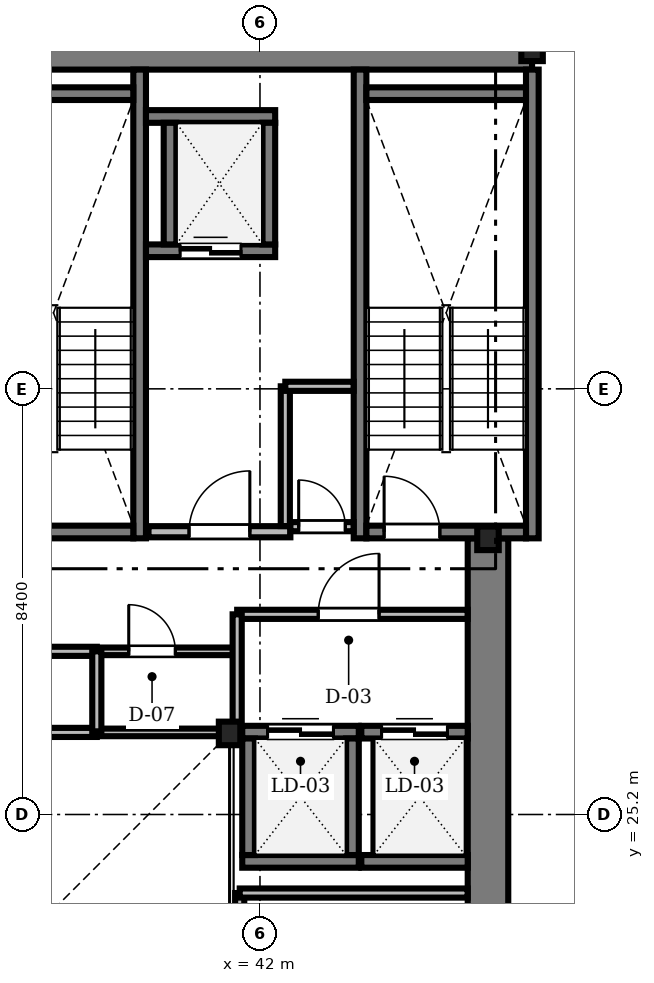
"""IFC4 building model, lengths in metres.
Left out: names, types, materials, properties, quantities, classifications, styles, units other than length and angle.
Written with IfcOpenShell. Run it as: python <this file> out.ifc"""

import sys

from ifc_helpers import new_model, si_unit, direction, frame, frame_2d, origin, origin_2d, place, context, subcontext, project, spatial, rectangle, i_section, extrude, source, transform, mapped, element, fill, save


model = new_model("IFC4")
c1 = context("Model", 3, precision=1e-05, world=origin(), true_north=direction((0.0, 1.0)))
c2 = subcontext(c1, "Body", "Model", "MODEL_VIEW")
j1 = project(units=[si_unit("LENGTHUNIT", "METRE"), si_unit("PLANEANGLEUNIT", "RADIAN")], contexts=[c1])
p1 = place(None, origin())
s1 = spatial("IfcSite", under=j1, at=p1, CompositionType="ELEMENT")
p2 = place(p1, origin())
s2 = spatial("IfcBuilding", under=s1, at=p2, CompositionType="ELEMENT")
p3 = place(p2, frame((0.0, 0.0, 140.9)))
s3 = spatial("IfcBuildingStorey", under=s2, at=p3, CompositionType="ELEMENT", Elevation=140.9)
m1 = source(origin(), c2, "Body", "SweptSolid", [
    extrude(rectangle(XDim=17.52, YDim=0.8, at=frame_2d((8.76, 0.0))), origin(), (0.0, 0.0, 1.0), 3.46),
])
p4 = place(p3, frame((29.85, 40.3, 0.0), z_axis=(0.0, 0.0, 1.0), x_axis=(1.0, 0.0, 0.0)))
e1 = element("IfcWall", 1, at=p4, inside=s3, PredefinedType="SHEAR", context=c2, shape_type="MappedRepresentation", body=[
    mapped(m1, transform((0.0, 0.0, 0.0), scale=1.0)),
])
m2 = source(origin(), c2, "Body", "SweptSolid", [
    extrude(rectangle(XDim=13.15, YDim=0.8, at=frame_2d((6.575, 0.0))), origin(), (0.0, 0.0, 1.0), 3.46),
])
p5 = place(p3, frame((46.5, 17.5, 0.0), z_axis=(0.0, 0.0, 1.0), x_axis=(0.0, 1.0, 0.0)))
e2 = element("IfcWall", 2, at=p5, inside=s3, PredefinedType="SHEAR", context=c2, shape_type="MappedRepresentation", body=[
    mapped(m2, transform((0.0, 0.0, 0.0), scale=1.0)),
])
m3 = source(origin(), c2, "Body", "SweptSolid", [
    extrude(i_section(OverallWidth=0.424, OverallDepth=0.465, WebThickness=0.035, FlangeThickness=0.056, FilletRadius=0.015, at=origin_2d()), origin(), (0.0, 0.0, 1.0), 3.46),
])
for number, where, z_axis, x_axis in (
    (3, (41.4, 26.8, 0.0), (0.0, 0.0, 1.0), (1.0, 0.0, 0.0)),
    (4, (46.5, 30.65, 0.0), (0.0, 0.0, 1.0), (1.0, 0.0, 0.0)),
    (5, (47.37, 40.3, 0.0), (0.0, 0.0, 1.0), (1.0, 0.0, 0.0)),
):
    element("IfcColumn", number, at=place(p3, frame(where, z_axis=z_axis, x_axis=x_axis)), inside=s3, PredefinedType="COLUMN", context=c2, shape_type="MappedRepresentation", body=[
        mapped(m3, transform((0.0, 0.0, 0.0), scale=1.0)),
    ])
m4 = source(origin(), c2, "Body", "SweptSolid", [
    extrude(rectangle(XDim=9.25, YDim=0.25, at=frame_2d((4.625, 0.0))), origin(), (0.0, 0.0, 1.0), 3.5),
])
p6 = place(p3, frame((39.625, 30.65, 0.0), z_axis=(0.0, 0.0, 1.0), x_axis=(0.0, 1.0, 0.0)))
e6 = element("IfcWall", 6, at=p6, inside=s3, PredefinedType="SOLIDWALL", context=c2, shape_type="MappedRepresentation", body=[
    mapped(m4, transform((0.0, 0.0, 0.0), scale=1.0)),
])
m5 = source(origin(), c2, "Body", "SweptSolid", [
    extrude(rectangle(XDim=3.15, YDim=0.25, at=frame_2d((1.575, 0.0))), origin(), (0.0, 0.0, 1.0), 3.5),
])
p7 = place(p3, frame((36.35, 39.425, 0.0), z_axis=(0.0, 0.0, 1.0), x_axis=(1.0, 0.0, 0.0)))
e7 = element("IfcWall", 7, at=p7, inside=s3, PredefinedType="SOLIDWALL", context=c2, shape_type="MappedRepresentation", body=[
    mapped(m5, transform((0.0, 0.0, 0.0), scale=1.0)),
])
p8 = place(p3, frame((36.35, 30.775, 0.0), z_axis=(0.0, 0.0, 1.0), x_axis=(1.0, 0.0, 0.0)))
e8 = element("IfcWall", 8, at=p8, inside=s3, PredefinedType="SOLIDWALL", context=c2, shape_type="MappedRepresentation", body=[
    mapped(m5, transform((0.0, 0.0, 0.0), scale=1.0)),
])
m6 = source(origin(), c2, "Body", "SweptSolid", [
    extrude(rectangle(XDim=1.1, YDim=2.2, at=frame_2d((0.55, 1.1))), frame((0.0, 0.135, 0.0), z_axis=(0.0, -1.0, 0.0), x_axis=(1.0, 0.0, 0.0)), (0.0, 0.0, 1.0), 0.27),
])
p9 = place(p8, frame((0.35, 0.0, 0.0)))
e9 = element("IfcOpeningElement", 9, at=p9, cuts=e8, PredefinedType="OPENING", context=c2, shape_type="MappedRepresentation", body=[
    mapped(m6, transform((0.0, 0.0, 0.0), scale=1.0)),
])
for number, where, z_axis, x_axis in (
    (10, (43.975, 30.65, 0.0), (0.0, 0.0, 1.0), (0.0, 1.0, 0.0)),
    (11, (47.375, 30.65, 0.0), (0.0, 0.0, 1.0), (0.0, 1.0, 0.0)),
):
    element("IfcWall", number, at=place(p3, frame(where, z_axis=z_axis, x_axis=x_axis)), inside=s3, PredefinedType="SOLIDWALL", context=c2, shape_type="MappedRepresentation", body=[
        mapped(m4, transform((0.0, 0.0, 0.0), scale=1.0)),
    ])
p10 = place(p3, frame((44.1, 39.425, 0.0), z_axis=(0.0, 0.0, 1.0), x_axis=(1.0, 0.0, 0.0)))
e12 = element("IfcWall", 12, at=p10, inside=s3, PredefinedType="SOLIDWALL", context=c2, shape_type="MappedRepresentation", body=[
    mapped(m5, transform((0.0, 0.0, 0.0), scale=1.0)),
])
p11 = place(p3, frame((44.1, 30.775, 0.0), z_axis=(0.0, 0.0, 1.0), x_axis=(1.0, 0.0, 0.0)))
e13 = element("IfcWall", 13, at=p11, inside=s3, PredefinedType="SOLIDWALL", context=c2, shape_type="MappedRepresentation", body=[
    mapped(m5, transform((0.0, 0.0, 0.0), scale=1.0)),
])
p12 = place(p11, frame((0.35, 0.0, 0.0)))
e14 = element("IfcOpeningElement", 14, at=p12, cuts=e13, PredefinedType="OPENING", context=c2, shape_type="MappedRepresentation", body=[
    mapped(m6, transform((0.0, 0.0, 0.0), scale=1.0)),
])
m7 = source(origin(), c2, "Body", "SweptSolid", [
    extrude(rectangle(XDim=2.8, YDim=0.22, at=frame_2d((1.4, 0.0))), origin(), (0.0, 0.0, 1.0), 3.46),
])
p13 = place(p3, frame((39.8, 30.78, 0.0), z_axis=(0.0, 0.0, 1.0), x_axis=(1.0, 0.0, 0.0)))
e15 = element("IfcWall", 15, at=p13, inside=s3, PredefinedType="SOLIDWALL", context=c2, shape_type="MappedRepresentation", body=[
    mapped(m7, transform((0.0, 0.0, 0.0), scale=1.0)),
])
m8 = source(origin(), c2, "Body", "SweptSolid", [
    extrude(rectangle(XDim=1.2, YDim=2.2, at=frame_2d((0.6, 1.1))), frame((0.0, 0.12, 0.0), z_axis=(0.0, -1.0, 0.0), x_axis=(1.0, 0.0, 0.0)), (0.0, 0.0, 1.0), 0.24),
])
p14 = place(p13, frame((0.8, 0.0, 0.0)))
e16 = element("IfcOpeningElement", 16, at=p14, cuts=e15, PredefinedType="OPENING", context=c2, shape_type="MappedRepresentation", body=[
    mapped(m8, transform((0.0, 0.0, 0.0), scale=1.0)),
])
m9 = source(origin(), c2, "Body", "SweptSolid", [
    extrude(rectangle(XDim=2.55, YDim=0.25, at=frame_2d((1.275, 0.0))), origin(), (0.0, 0.0, 1.0), 3.46),
])
p15 = place(p3, frame((39.75, 36.325, 0.0), z_axis=(0.0, 0.0, 1.0), x_axis=(1.0, 0.0, 0.0)))
e17 = element("IfcWall", 17, at=p15, inside=s3, PredefinedType="SOLIDWALL", context=c2, shape_type="MappedRepresentation", body=[
    mapped(m9, transform((0.0, 0.0, 0.0), scale=1.0)),
])
m10 = source(origin(), c2, "Body", "SweptSolid", [
    extrude(rectangle(XDim=1.2, YDim=2.25, at=frame_2d((0.6, 1.125))), frame((0.0, 0.135, 0.0), z_axis=(0.0, -1.0, 0.0), x_axis=(1.0, 0.0, 0.0)), (0.0, 0.0, 1.0), 0.27),
])
p16 = place(p15, frame((0.675, 0.0, 0.0)))
e18 = element("IfcOpeningElement", 18, at=p16, cuts=e17, PredefinedType="OPENING", context=c2, shape_type="MappedRepresentation", body=[
    mapped(m10, transform((0.0, 0.0, 0.0), scale=1.0)),
])
p17 = place(p3, frame((39.75, 38.975, 0.0), z_axis=(0.0, 0.0, 1.0), x_axis=(1.0, 0.0, 0.0)))
e19 = element("IfcWall", 19, at=p17, inside=s3, PredefinedType="SOLIDWALL", context=c2, shape_type="MappedRepresentation", body=[
    mapped(m9, transform((0.0, 0.0, 0.0), scale=1.0)),
])
m11 = source(origin(), c2, "Body", "SweptSolid", [
    extrude(rectangle(XDim=2.4, YDim=0.25, at=frame_2d((1.2, 0.0))), origin(), (0.0, 0.0, 1.0), 3.46),
])
for number, where, z_axis, x_axis in (
    (20, (40.225, 36.45, 0.0), (0.0, 0.0, 1.0), (0.0, 1.0, 0.0)),
    (21, (42.175, 36.45, 0.0), (0.0, 0.0, 1.0), (0.0, 1.0, 0.0)),
):
    element("IfcWall", number, at=place(p3, frame(where, z_axis=z_axis, x_axis=x_axis)), inside=s3, PredefinedType="SOLIDWALL", context=c2, shape_type="MappedRepresentation", body=[
        mapped(m11, transform((0.0, 0.0, 0.0), scale=1.0)),
    ])
m12 = source(origin(), c2, "Body", "SweptSolid", [
    extrude(rectangle(XDim=2.3, YDim=0.25, at=frame_2d((1.15, 0.0))), origin(), (0.0, 0.0, 1.0), 3.46),
])
p18 = place(p3, frame((41.65, 24.275, 0.0), z_axis=(0.0, 0.0, 1.0), x_axis=(1.0, 0.0, 0.0)))
e22 = element("IfcWall", 22, at=p18, inside=s3, PredefinedType="SOLIDWALL", context=c2, shape_type="MappedRepresentation", body=[
    mapped(m12, transform((0.0, 0.0, 0.0), scale=1.0)),
])
p19 = place(p3, frame((41.65, 26.825, 0.0), z_axis=(0.0, 0.0, 1.0), x_axis=(1.0, 0.0, 0.0)))
e23 = element("IfcWall", 23, at=p19, inside=s3, PredefinedType="SOLIDWALL", context=c2, shape_type="MappedRepresentation", body=[
    mapped(m12, transform((0.0, 0.0, 0.0), scale=1.0)),
])
m13 = source(origin(), c2, "Body", "SweptSolid", [
    extrude(rectangle(XDim=1.3, YDim=2.3, at=frame_2d((0.65, 1.15))), frame((0.0, 0.135, 0.0), z_axis=(0.0, -1.0, 0.0), x_axis=(1.0, 0.0, 0.0)), (0.0, 0.0, 1.0), 0.27),
])
p20 = place(p19, frame((0.5, 0.0, 0.0)))
e24 = element("IfcOpeningElement", 24, at=p20, cuts=e23, PredefinedType="OPENING", context=c2, shape_type="MappedRepresentation", body=[
    mapped(m13, transform((0.0, 0.0, 0.0), scale=1.0)),
])
for number, where, z_axis, x_axis in (
    (25, (41.775, 24.4, 0.0), (0.0, 0.0, 1.0), (0.0, 1.0, 0.0)),
    (26, (43.825, 24.4, 0.0), (0.0, 0.0, 1.0), (0.0, 1.0, 0.0)),
):
    element("IfcWall", number, at=place(p3, frame(where, z_axis=z_axis, x_axis=x_axis)), inside=s3, PredefinedType="SOLIDWALL", context=c2, shape_type="MappedRepresentation", body=[
        mapped(m12, transform((0.0, 0.0, 0.0), scale=1.0)),
    ])
m14 = source(origin(), c2, "Body", "SweptSolid", [
    extrude(rectangle(XDim=2.1, YDim=0.25, at=frame_2d((1.05, 0.0))), origin(), (0.0, 0.0, 1.0), 3.46),
])
p21 = place(p3, frame((44.0, 24.275, 0.0), z_axis=(0.0, 0.0, 1.0), x_axis=(1.0, 0.0, 0.0)))
e27 = element("IfcWall", 27, at=p21, inside=s3, PredefinedType="SOLIDWALL", context=c2, shape_type="MappedRepresentation", body=[
    mapped(m14, transform((0.0, 0.0, 0.0), scale=1.0)),
])
p22 = place(p3, frame((44.0, 26.825, 0.0), z_axis=(0.0, 0.0, 1.0), x_axis=(1.0, 0.0, 0.0)))
e28 = element("IfcWall", 28, at=p22, inside=s3, PredefinedType="SOLIDWALL", context=c2, shape_type="MappedRepresentation", body=[
    mapped(m14, transform((0.0, 0.0, 0.0), scale=1.0)),
])
p23 = place(p22, frame((0.4, 0.0, 0.0)))
e29 = element("IfcOpeningElement", 29, at=p23, cuts=e28, PredefinedType="OPENING", context=c2, shape_type="MappedRepresentation", body=[
    mapped(m13, transform((0.0, 0.0, 0.0), scale=1.0)),
])
m15 = source(origin(), c2, "Body", "SweptSolid", [
    extrude(rectangle(XDim=7.33, YDim=0.18, at=frame_2d((3.665, 0.0))), origin(), (0.0, 0.0, 1.0), 3.092),
])
p24 = place(p3, frame((31.45, 28.42, 0.0), z_axis=(0.0, 0.0, 1.0), x_axis=(1.0, 0.0, 0.0)))
e30 = element("IfcWall", 30, at=p24, inside=s3, PredefinedType="PARTITIONING", context=c2, shape_type="MappedRepresentation", body=[
    mapped(m15, transform((0.0, 0.0, 0.0), scale=1.0)),
])
m16 = source(origin(), c2, "Body", "SweptSolid", [
    extrude(rectangle(XDim=0.95, YDim=2.15, at=frame_2d((0.475, 1.075))), frame((0.0, 0.1, 0.0), z_axis=(0.0, -1.0, 0.0), x_axis=(1.0, 0.0, 0.0)), (0.0, 0.0, 1.0), 0.2),
])
p25 = place(p24, frame((0.65, 0.0, 0.0)))
e31 = element("IfcOpeningElement", 31, at=p25, cuts=e30, PredefinedType="OPENING", context=c2, shape_type="MappedRepresentation", body=[
    mapped(m16, transform((0.0, 0.0, 0.0), scale=1.0)),
])
m17 = source(origin(), c2, "Body", "SweptSolid", [
    extrude(rectangle(XDim=4.548, YDim=0.18, at=frame_2d((2.274, 0.0))), origin(), (0.0, 0.0, 1.0), 3.092),
])
p26 = place(p3, frame((41.55, 29.15, 0.0), z_axis=(0.0, 0.0, 1.0), x_axis=(1.0, 0.0, 0.0)))
e32 = element("IfcWall", 32, at=p26, inside=s3, PredefinedType="PARTITIONING", context=c2, shape_type="MappedRepresentation", body=[
    mapped(m17, transform((0.0, 0.0, 0.0), scale=1.0)),
])
m18 = source(origin(), c2, "Body", "SweptSolid", [
    extrude(rectangle(XDim=1.2, YDim=2.2, at=frame_2d((0.6, 1.1))), frame((0.0, 0.1, 0.0), z_axis=(0.0, -1.0, 0.0), x_axis=(1.0, 0.0, 0.0)), (0.0, 0.0, 1.0), 0.2),
])
p27 = place(p26, frame((1.6, 0.0, 0.0)))
e33 = element("IfcOpeningElement", 33, at=p27, cuts=e32, PredefinedType="OPENING", context=c2, shape_type="MappedRepresentation", body=[
    mapped(m18, transform((0.0, 0.0, 0.0), scale=1.0)),
])
m19 = source(origin(), c2, "Body", "SweptSolid", [
    extrude(rectangle(XDim=2.74, YDim=0.15, at=frame_2d((1.37, 0.0))), origin(), (0.0, 0.0, 1.0), 3.46),
])
p28 = place(p3, frame((38.78, 28.42, 0.0), z_axis=(0.0, 0.0, 1.0), x_axis=(1.0, 0.0, 0.0)))
e34 = element("IfcWall", 34, at=p28, inside=s3, PredefinedType="PARTITIONING", context=c2, shape_type="MappedRepresentation", body=[
    mapped(m19, transform((0.0, 0.0, 0.0), scale=1.0)),
])
m20 = source(origin(), c2, "Body", "SweptSolid", [
    extrude(rectangle(XDim=0.92, YDim=2.1, at=frame_2d((0.46, 1.05))), frame((0.0, 0.085, 0.0), z_axis=(0.0, -1.0, 0.0), x_axis=(1.0, 0.0, 0.0)), (0.0, 0.0, 1.0), 0.17),
])
p29 = place(p28, frame((0.63, 0.0, 0.0)))
e35 = element("IfcOpeningElement", 35, at=p29, cuts=e34, PredefinedType="OPENING", context=c2, shape_type="MappedRepresentation", body=[
    mapped(m20, transform((0.0, 0.0, 0.0), scale=1.0)),
])
m21 = source(origin(), c2, "Body", "SweptSolid", [
    extrude(rectangle(XDim=1.248, YDim=0.18, at=frame_2d((0.624, 0.0))), origin(), (0.0, 0.0, 1.0), 3.46),
])
p30 = place(p3, frame((42.6, 30.88, 0.0), z_axis=(0.0, 0.0, 1.0), x_axis=(1.0, 0.0, 0.0)))
e36 = element("IfcWall", 36, at=p30, inside=s3, PredefinedType="PARTITIONING", context=c2, shape_type="MappedRepresentation", body=[
    mapped(m21, transform((0.0, 0.0, 0.0), scale=1.0)),
])
m22 = source(origin(), c2, "Body", "SweptSolid", [
    extrude(rectangle(XDim=0.92, YDim=2.1, at=frame_2d((0.46, 1.05))), frame((0.0, 0.1, 0.0), z_axis=(0.0, -1.0, 0.0), x_axis=(1.0, 0.0, 0.0)), (0.0, 0.0, 1.0), 0.2),
])
p31 = place(p30, frame((0.164, 0.0, 0.0)))
e37 = element("IfcOpeningElement", 37, at=p31, cuts=e36, PredefinedType="OPENING", context=c2, shape_type="MappedRepresentation", body=[
    mapped(m22, transform((0.0, 0.0, 0.0), scale=1.0)),
])
m23 = source(origin(), c2, "Body", "SweptSolid", [
    extrude(rectangle(XDim=7.33, YDim=0.18, at=frame_2d((3.665, 0.0))), origin(), (0.0, 0.0, 1.0), 3.002),
])
p32 = place(p3, frame((31.45, 26.82, 0.0), z_axis=(0.0, 0.0, 1.0), x_axis=(1.0, 0.0, 0.0)))
e38 = element("IfcWall", 38, at=p32, inside=s3, PredefinedType="PARTITIONING", context=c2, shape_type="MappedRepresentation", body=[
    mapped(m23, transform((0.0, 0.0, 0.0), scale=1.0)),
])
m24 = source(origin(), c2, "Body", "SweptSolid", [
    extrude(rectangle(XDim=7.15, YDim=0.18, at=frame_2d((3.575, 0.0))), origin(), (0.0, 0.0, 1.0), 2.852),
])
p33 = place(p3, frame((41.6, 16.5, 0.0), z_axis=(0.0, 0.0, 1.0), x_axis=(0.0, 1.0, 0.0)))
e39 = element("IfcWall", 39, at=p33, inside=s3, PredefinedType="PARTITIONING", context=c2, shape_type="MappedRepresentation", body=[
    mapped(m24, transform((0.0, 0.0, 0.0), scale=1.0)),
])
m25 = source(origin(), c2, "Body", "SweptSolid", [
    extrude(rectangle(XDim=4.498, YDim=0.18, at=frame_2d((2.249, 0.0))), origin(), (0.0, 0.0, 1.0), 3.46),
])
p34 = place(p3, frame((41.6, 23.65, 0.0), z_axis=(0.0, 0.0, 1.0), x_axis=(1.0, 0.0, 0.0)))
e40 = element("IfcWall", 40, at=p34, inside=s3, PredefinedType="PARTITIONING", context=c2, shape_type="MappedRepresentation", body=[
    mapped(m25, transform((0.0, 0.0, 0.0), scale=1.0)),
])
m26 = source(origin(), c2, "Body", "SweptSolid", [
    extrude(rectangle(XDim=2.758, YDim=0.18, at=frame_2d((1.379, 0.0))), origin(), (0.0, 0.0, 1.0), 3.46),
])
p35 = place(p3, frame((42.5, 30.892, 0.0), z_axis=(0.0, 0.0, 1.0), x_axis=(0.0, 1.0, 0.0)))
e41 = element("IfcWall", 41, at=p35, inside=s3, PredefinedType="PARTITIONING", context=c2, shape_type="MappedRepresentation", body=[
    mapped(m26, transform((0.0, 0.0, 0.0), scale=1.0)),
])
m27 = source(origin(), c2, "Body", "SweptSolid", [
    extrude(rectangle(XDim=2.74, YDim=0.15, at=frame_2d((1.37, 0.0))), origin(), (0.0, 0.0, 1.0), 2.852),
])
p36 = place(p3, frame((38.78, 26.82, 0.0), z_axis=(0.0, 0.0, 1.0), x_axis=(1.0, 0.0, 0.0)))
e42 = element("IfcWall", 42, at=p36, inside=s3, PredefinedType="PARTITIONING", context=c2, shape_type="MappedRepresentation", body=[
    mapped(m27, transform((0.0, 0.0, 0.0), scale=1.0)),
])
m28 = source(origin(), c2, "Body", "SweptSolid", [
    extrude(rectangle(XDim=2.35, YDim=0.18, at=frame_2d((1.175, 0.0))), origin(), (0.0, 0.0, 1.0), 2.852),
])
p37 = place(p3, frame((41.55, 26.8, 0.0), z_axis=(0.0, 0.0, 1.0), x_axis=(0.0, 1.0, 0.0)))
e43 = element("IfcWall", 43, at=p37, inside=s3, PredefinedType="PARTITIONING", context=c2, shape_type="MappedRepresentation", body=[
    mapped(m28, transform((0.0, 0.0, 0.0), scale=1.0)),
])
m29 = source(origin(), c2, "Body", "SweptSolid", [
    extrude(rectangle(XDim=1.6, YDim=0.18, at=frame_2d((0.8, 0.0))), origin(), (0.0, 0.0, 1.0), 3.002),
])
p38 = place(p3, frame((38.78, 26.82, 0.0), z_axis=(0.0, 0.0, 1.0), x_axis=(0.0, 1.0, 0.0)))
e44 = element("IfcWall", 44, at=p38, inside=s3, PredefinedType="PARTITIONING", context=c2, shape_type="MappedRepresentation", body=[
    mapped(m29, transform((0.0, 0.0, 0.0), scale=1.0)),
])
m30 = source(origin(), c2, "Body", "SweptSolid", [
    extrude(rectangle(XDim=1.348, YDim=0.18, at=frame_2d((0.674, 0.0))), origin(), (0.0, 0.0, 1.0), 3.46),
])
p39 = place(p3, frame((42.5, 33.65, 0.0), z_axis=(0.0, 0.0, 1.0), x_axis=(1.0, 0.0, 0.0)))
e45 = element("IfcWall", 45, at=p39, inside=s3, PredefinedType="PARTITIONING", context=c2, shape_type="MappedRepresentation", body=[
    mapped(m30, transform((0.0, 0.0, 0.0), scale=1.0)),
])
m31 = source(origin(), c2, "Body", "SweptSolid", [
    extrude(rectangle(XDim=1.1, YDim=2.2, at=frame_2d((0.55, 1.1))), frame((0.0, 0.025, 0.0), z_axis=(0.0, -1.0, 0.0), x_axis=(1.0, 0.0, 0.0)), (0.0, 0.0, 1.0), 0.05),
])
p40 = place(p12, origin())
e46 = element("IfcDoor", 46, at=p40, inside=s3, OperationType="SINGLE_SWING_LEFT", PredefinedType="DOOR", context=c2, shape_type="MappedRepresentation", body=[
    mapped(m31, transform((0.0, 0.0, 0.0), scale=1.0)),
])
fill(e14, e46)
m32 = source(origin(), c2, "Body", "SweptSolid", [
    extrude(rectangle(XDim=1.2, YDim=2.2, at=frame_2d((0.6, 1.1))), frame((0.0, 0.025, 0.0), z_axis=(0.0, -1.0, 0.0), x_axis=(1.0, 0.0, 0.0)), (0.0, 0.0, 1.0), 0.05),
])
p41 = place(p14, origin())
e47 = element("IfcDoor", 47, at=p41, inside=s3, OperationType="SINGLE_SWING_RIGHT", PredefinedType="DOOR", context=c2, shape_type="MappedRepresentation", body=[
    mapped(m32, transform((0.0, 0.0, 0.0), scale=1.0)),
])
fill(e16, e47)
m33 = source(origin(), c2, "Body", "SweptSolid", [
    extrude(rectangle(XDim=1.2, YDim=2.25, at=frame_2d((0.6, 1.125))), frame((0.0, 0.025, 0.0), z_axis=(0.0, -1.0, 0.0), x_axis=(1.0, 0.0, 0.0)), (0.0, 0.0, 1.0), 0.05),
])
p42 = place(p16, origin())
e48 = element("IfcDoor", 48, at=p42, inside=s3, OperationType="DOUBLE_DOOR_SLIDING", PredefinedType="DOOR", context=c2, shape_type="MappedRepresentation", body=[
    mapped(m33, transform((0.0, 0.0, 0.0), scale=1.0)),
])
fill(e18, e48)
m34 = source(origin(), c2, "Body", "SweptSolid", [
    extrude(rectangle(XDim=1.3, YDim=2.3, at=frame_2d((0.65, 1.15))), frame((0.0, 0.025, 0.0), z_axis=(0.0, -1.0, 0.0), x_axis=(1.0, 0.0, 0.0)), (0.0, 0.0, 1.0), 0.05),
])
p43 = place(p20, origin())
e49 = element("IfcDoor", 49, at=p43, inside=s3, OperationType="DOUBLE_DOOR_SLIDING", PredefinedType="DOOR", context=c2, shape_type="MappedRepresentation", body=[
    mapped(m34, transform((0.0, 0.0, 0.0), scale=1.0)),
])
fill(e24, e49)
p44 = place(p23, origin())
e50 = element("IfcDoor", 50, at=p44, inside=s3, OperationType="DOUBLE_DOOR_SLIDING", PredefinedType="DOOR", context=c2, shape_type="MappedRepresentation", body=[
    mapped(m34, transform((0.0, 0.0, 0.0), scale=1.0)),
])
fill(e29, e50)
p45 = place(p27, origin())
e51 = element("IfcDoor", 51, at=p45, inside=s3, OperationType="SINGLE_SWING_RIGHT", PredefinedType="DOOR", context=c2, shape_type="MappedRepresentation", body=[
    mapped(m32, transform((0.0, 0.0, 0.0), scale=1.0)),
])
fill(e33, e51)
m35 = source(origin(), c2, "Body", "SweptSolid", [
    extrude(rectangle(XDim=0.92, YDim=2.1, at=frame_2d((0.46, 1.05))), frame((0.0, 0.025, 0.0), z_axis=(0.0, -1.0, 0.0), x_axis=(1.0, 0.0, 0.0)), (0.0, 0.0, 1.0), 0.05),
])
p46 = place(p29, origin())
e52 = element("IfcDoor", 52, at=p46, inside=s3, OperationType="SINGLE_SWING_LEFT", PredefinedType="DOOR", context=c2, shape_type="MappedRepresentation", body=[
    mapped(m35, transform((0.0, 0.0, 0.0), scale=1.0)),
])
fill(e35, e52)
p47 = place(p31, origin())
e53 = element("IfcDoor", 53, at=p47, inside=s3, OperationType="SINGLE_SWING_LEFT", PredefinedType="DOOR", context=c2, shape_type="MappedRepresentation", body=[
    mapped(m35, transform((0.0, 0.0, 0.0), scale=1.0)),
])
fill(e37, e53)
save(model, sys.argv[1])
